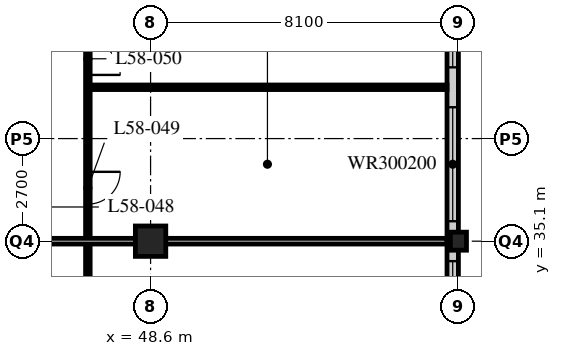
"""IFC4 building model, lengths in metres.
Left out: names, types, materials, properties, quantities, classifications, styles, units other than length and angle.
Written with IfcOpenShell. Run it as: python <this file> out.ifc"""

import sys

from ifc_helpers import new_model, si_unit, direction, frame, frame_2d, origin, origin_2d, place, context, subcontext, project, spatial, rectangle, hollow_rectangle, i_section, extrude, element, fill, save


model = new_model("IFC4")
c1 = context("Model", 3, precision=1e-05, world=origin(), true_north=direction((0.0, 1.0)))
c2 = subcontext(c1, "Body", "Model", "MODEL_VIEW")
j1 = project(units=[si_unit("LENGTHUNIT", "METRE"), si_unit("PLANEANGLEUNIT", "RADIAN")], contexts=[c1])
p1 = place(None, origin())
s1 = spatial("IfcSite", under=j1, at=p1, CompositionType="ELEMENT")
p2 = place(p1, origin())
s2 = spatial("IfcBuilding", under=s1, at=p2, CompositionType="ELEMENT")
p3 = place(p2, frame((0.0, 0.0, 224.4)))
s3 = spatial("IfcBuildingStorey", under=s2, at=p3, CompositionType="ELEMENT", Elevation=224.4)
p4 = place(p3, frame((48.6, 35.1, 0.0), z_axis=(0.0, 0.0, 1.0), x_axis=(1.0, 0.0, 0.0)))
e1 = element("IfcColumn", 1, at=p4, inside=s3, PredefinedType="COLUMN", context=c2, shape_type="SweptSolid", body=[
    extrude(hollow_rectangle(XDim=0.8, YDim=0.8, WallThickness=0.08, at=origin_2d()), origin(), (0.0, 0.0, 1.0), 3.6),
])
p5 = place(p3, frame((56.7, 35.1, 0.0), z_axis=(0.0, 0.0, 1.0), x_axis=(1.0, 0.0, 0.0)))
e2 = element("IfcColumn", 2, at=p5, inside=s3, PredefinedType="COLUMN", context=c2, shape_type="SweptSolid", body=[
    extrude(i_section(OverallWidth=0.424, OverallDepth=0.475, WebThickness=0.048, FlangeThickness=0.077, FilletRadius=0.015, at=origin_2d()), origin(), (0.0, 0.0, 1.0), 3.6),
])
p6 = place(p3, frame((56.55, 19.2, 0.0), z_axis=(0.0, 0.0, 1.0), x_axis=(0.0, 1.0, 0.0)))
e3 = element("IfcWall", 3, at=p6, inside=s3, PredefinedType="SOLIDWALL", context=c2, shape_type="SweptSolid", body=[
    extrude(rectangle(XDim=32.1, YDim=0.3, at=frame_2d((16.05, 0.0))), origin(), (0.0, 0.0, 1.0), 3.39),
])
p7 = place(p6, frame((0.225, 0.0, 0.6)))
e4 = element("IfcOpeningElement", 4, at=p7, cuts=e3, PredefinedType="OPENING", context=c2, shape_type="SweptSolid", body=[
    extrude(rectangle(XDim=3.0, YDim=2.0, at=frame_2d((1.5, 1.0))), frame((0.0, 0.16, 0.0), z_axis=(0.0, -1.0, 0.0), x_axis=(1.0, 0.0, 0.0)), (0.0, 0.0, 1.0), 0.32),
])
p8 = place(p6, frame((4.275, 0.0, 0.6)))
e5 = element("IfcOpeningElement", 5, at=p8, cuts=e3, PredefinedType="OPENING", context=c2, shape_type="SweptSolid", body=[
    extrude(rectangle(XDim=3.0, YDim=2.0, at=frame_2d((1.5, 1.0))), frame((0.0, 0.16, 0.0), z_axis=(0.0, -1.0, 0.0), x_axis=(1.0, 0.0, 0.0)), (0.0, 0.0, 1.0), 0.32),
])
p9 = place(p6, frame((8.325, 0.0, 0.6)))
e6 = element("IfcOpeningElement", 6, at=p9, cuts=e3, PredefinedType="OPENING", context=c2, shape_type="SweptSolid", body=[
    extrude(rectangle(XDim=3.0, YDim=2.0, at=frame_2d((1.5, 1.0))), frame((0.0, 0.16, 0.0), z_axis=(0.0, -1.0, 0.0), x_axis=(1.0, 0.0, 0.0)), (0.0, 0.0, 1.0), 0.32),
])
p10 = place(p6, frame((12.375, 0.0, 0.6)))
e7 = element("IfcOpeningElement", 7, at=p10, cuts=e3, PredefinedType="OPENING", context=c2, shape_type="SweptSolid", body=[
    extrude(rectangle(XDim=3.0, YDim=2.0, at=frame_2d((1.5, 1.0))), frame((0.0, 0.16, 0.0), z_axis=(0.0, -1.0, 0.0), x_axis=(1.0, 0.0, 0.0)), (0.0, 0.0, 1.0), 0.32),
])
p11 = place(p6, frame((16.425, 0.0, 0.6)))
e8 = element("IfcOpeningElement", 8, at=p11, cuts=e3, PredefinedType="OPENING", context=c2, shape_type="SweptSolid", body=[
    extrude(rectangle(XDim=3.0, YDim=2.0, at=frame_2d((1.5, 1.0))), frame((0.0, 0.16, 0.0), z_axis=(0.0, -1.0, 0.0), x_axis=(1.0, 0.0, 0.0)), (0.0, 0.0, 1.0), 0.32),
])
p12 = place(p6, frame((20.475, 0.0, 0.6)))
e9 = element("IfcOpeningElement", 9, at=p12, cuts=e3, PredefinedType="OPENING", context=c2, shape_type="SweptSolid", body=[
    extrude(rectangle(XDim=3.0, YDim=2.0, at=frame_2d((1.5, 1.0))), frame((0.0, 0.16, 0.0), z_axis=(0.0, -1.0, 0.0), x_axis=(1.0, 0.0, 0.0)), (0.0, 0.0, 1.0), 0.32),
])
p13 = place(p6, frame((24.525, 0.0, 0.6)))
e10 = element("IfcOpeningElement", 10, at=p13, cuts=e3, PredefinedType="OPENING", context=c2, shape_type="SweptSolid", body=[
    extrude(rectangle(XDim=3.0, YDim=2.0, at=frame_2d((1.5, 1.0))), frame((0.0, 0.16, 0.0), z_axis=(0.0, -1.0, 0.0), x_axis=(1.0, 0.0, 0.0)), (0.0, 0.0, 1.0), 0.32),
])
p14 = place(p6, frame((28.575, 0.0, 0.6)))
e11 = element("IfcOpeningElement", 11, at=p14, cuts=e3, PredefinedType="OPENING", context=c2, shape_type="SweptSolid", body=[
    extrude(rectangle(XDim=3.0, YDim=2.0, at=frame_2d((1.5, 1.0))), frame((0.0, 0.16, 0.0), z_axis=(0.0, -1.0, 0.0), x_axis=(1.0, 0.0, 0.0)), (0.0, 0.0, 1.0), 0.32),
])
p15 = place(p3, frame((46.95, 18.9, 0.0), z_axis=(0.0, 0.0, 1.0), x_axis=(0.0, 1.0, 0.0)))
e12 = element("IfcWall", 12, at=p15, inside=s3, PredefinedType="PARTITIONING", context=c2, shape_type="SweptSolid", body=[
    extrude(rectangle(XDim=24.3, YDim=0.12, at=frame_2d((12.15, 0.0))), origin(), (0.0, 0.0, 1.0), 3.39),
])
p16 = place(p15, frame((0.975, 0.0, 0.0)))
e13 = element("IfcOpeningElement", 13, at=p16, cuts=e12, PredefinedType="OPENING", context=c2, shape_type="SweptSolid", body=[
    extrude(rectangle(XDim=0.85, YDim=2.1, at=frame_2d((0.425, 1.05))), frame((0.0, 0.07, 0.0), z_axis=(0.0, -1.0, 0.0), x_axis=(1.0, 0.0, 0.0)), (0.0, 0.0, 1.0), 0.14),
])
p17 = place(p15, frame((8.425, 0.0, 0.0)))
e14 = element("IfcOpeningElement", 14, at=p17, cuts=e12, PredefinedType="OPENING", context=c2, shape_type="SweptSolid", body=[
    extrude(rectangle(XDim=0.85, YDim=2.1, at=frame_2d((0.425, 1.05))), frame((0.0, 0.07, 0.0), z_axis=(0.0, -1.0, 0.0), x_axis=(1.0, 0.0, 0.0)), (0.0, 0.0, 1.0), 0.14),
])
p18 = place(p15, frame((12.475, 0.0, 0.0)))
e15 = element("IfcOpeningElement", 15, at=p18, cuts=e12, PredefinedType="OPENING", context=c2, shape_type="SweptSolid", body=[
    extrude(rectangle(XDim=0.85, YDim=2.1, at=frame_2d((0.425, 1.05))), frame((0.0, 0.07, 0.0), z_axis=(0.0, -1.0, 0.0), x_axis=(1.0, 0.0, 0.0)), (0.0, 0.0, 1.0), 0.14),
])
p19 = place(p15, frame((17.175, 0.0, 0.0)))
e16 = element("IfcOpeningElement", 16, at=p19, cuts=e12, PredefinedType="OPENING", context=c2, shape_type="SweptSolid", body=[
    extrude(rectangle(XDim=0.85, YDim=2.1, at=frame_2d((0.425, 1.05))), frame((0.0, 0.07, 0.0), z_axis=(0.0, -1.0, 0.0), x_axis=(1.0, 0.0, 0.0)), (0.0, 0.0, 1.0), 0.14),
])
p20 = place(p15, frame((20.575, 0.0, 0.0)))
e17 = element("IfcOpeningElement", 17, at=p20, cuts=e12, PredefinedType="OPENING", context=c2, shape_type="SweptSolid", body=[
    extrude(rectangle(XDim=0.85, YDim=2.1, at=frame_2d((0.425, 1.05))), frame((0.0, 0.07, 0.0), z_axis=(0.0, -1.0, 0.0), x_axis=(1.0, 0.0, 0.0)), (0.0, 0.0, 1.0), 0.14),
])
p21 = place(p3, frame((44.55, 35.1, 0.0), z_axis=(0.0, 0.0, 1.0), x_axis=(1.0, 0.0, 0.0)))
e18 = element("IfcWall", 18, at=p21, inside=s3, PredefinedType="PARTITIONING", context=c2, shape_type="SweptSolid", body=[
    extrude(rectangle(XDim=11.85, YDim=0.15, at=frame_2d((5.925, 0.0))), origin(), (0.0, 0.0, 1.0), 2.628),
])
p22 = place(p3, frame((46.95, 39.15, 0.0), z_axis=(0.0, 0.0, 1.0), x_axis=(1.0, 0.0, 0.0)))
e19 = element("IfcWall", 19, at=p22, inside=s3, PredefinedType="PARTITIONING", context=c2, shape_type="SweptSolid", body=[
    extrude(rectangle(XDim=9.45, YDim=0.12, at=frame_2d((4.725, 0.0))), origin(), (0.0, 0.0, 1.0), 3.39),
])
p23 = place(p10, origin())
e20 = element("IfcWindow", 20, at=p23, inside=s3, PartitioningType="SINGLE_PANEL", PredefinedType="WINDOW", context=c2, shape_type="SweptSolid", body=[
    extrude(rectangle(XDim=3.0, YDim=2.0, at=frame_2d((1.5, 1.0))), frame((0.0, 0.03, 0.0), z_axis=(0.0, -1.0, 0.0), x_axis=(1.0, 0.0, 0.0)), (0.0, 0.0, 1.0), 0.06),
])
fill(e7, e20)
p24 = place(p11, origin())
e21 = element("IfcWindow", 21, at=p24, inside=s3, PartitioningType="SINGLE_PANEL", PredefinedType="WINDOW", context=c2, shape_type="SweptSolid", body=[
    extrude(rectangle(XDim=3.0, YDim=2.0, at=frame_2d((1.5, 1.0))), frame((0.0, 0.03, 0.0), z_axis=(0.0, -1.0, 0.0), x_axis=(1.0, 0.0, 0.0)), (0.0, 0.0, 1.0), 0.06),
])
fill(e8, e21)
p25 = place(p12, origin())
e22 = element("IfcWindow", 22, at=p25, inside=s3, PartitioningType="SINGLE_PANEL", PredefinedType="WINDOW", context=c2, shape_type="SweptSolid", body=[
    extrude(rectangle(XDim=3.0, YDim=2.0, at=frame_2d((1.5, 1.0))), frame((0.0, 0.03, 0.0), z_axis=(0.0, -1.0, 0.0), x_axis=(1.0, 0.0, 0.0)), (0.0, 0.0, 1.0), 0.06),
])
fill(e9, e22)
p26 = place(p19, origin())
e23 = element("IfcDoor", 23, at=p26, inside=s3, OperationType="SINGLE_SWING_LEFT", PredefinedType="DOOR", context=c2, shape_type="SweptSolid", body=[
    extrude(rectangle(XDim=0.85, YDim=2.1, at=frame_2d((0.425, 1.05))), frame((0.0, 0.025, 0.0), z_axis=(0.0, -1.0, 0.0), x_axis=(1.0, 0.0, 0.0)), (0.0, 0.0, 1.0), 0.05),
])
fill(e16, e23)
p27 = place(p20, origin())
e24 = element("IfcDoor", 24, at=p27, inside=s3, OperationType="SINGLE_SWING_RIGHT", PredefinedType="DOOR", context=c2, shape_type="SweptSolid", body=[
    extrude(rectangle(XDim=0.85, YDim=2.1, at=frame_2d((0.425, 1.05))), frame((0.0, 0.025, 0.0), z_axis=(0.0, -1.0, 0.0), x_axis=(1.0, 0.0, 0.0)), (0.0, 0.0, 1.0), 0.05),
])
fill(e17, e24)
save(model, sys.argv[1])
